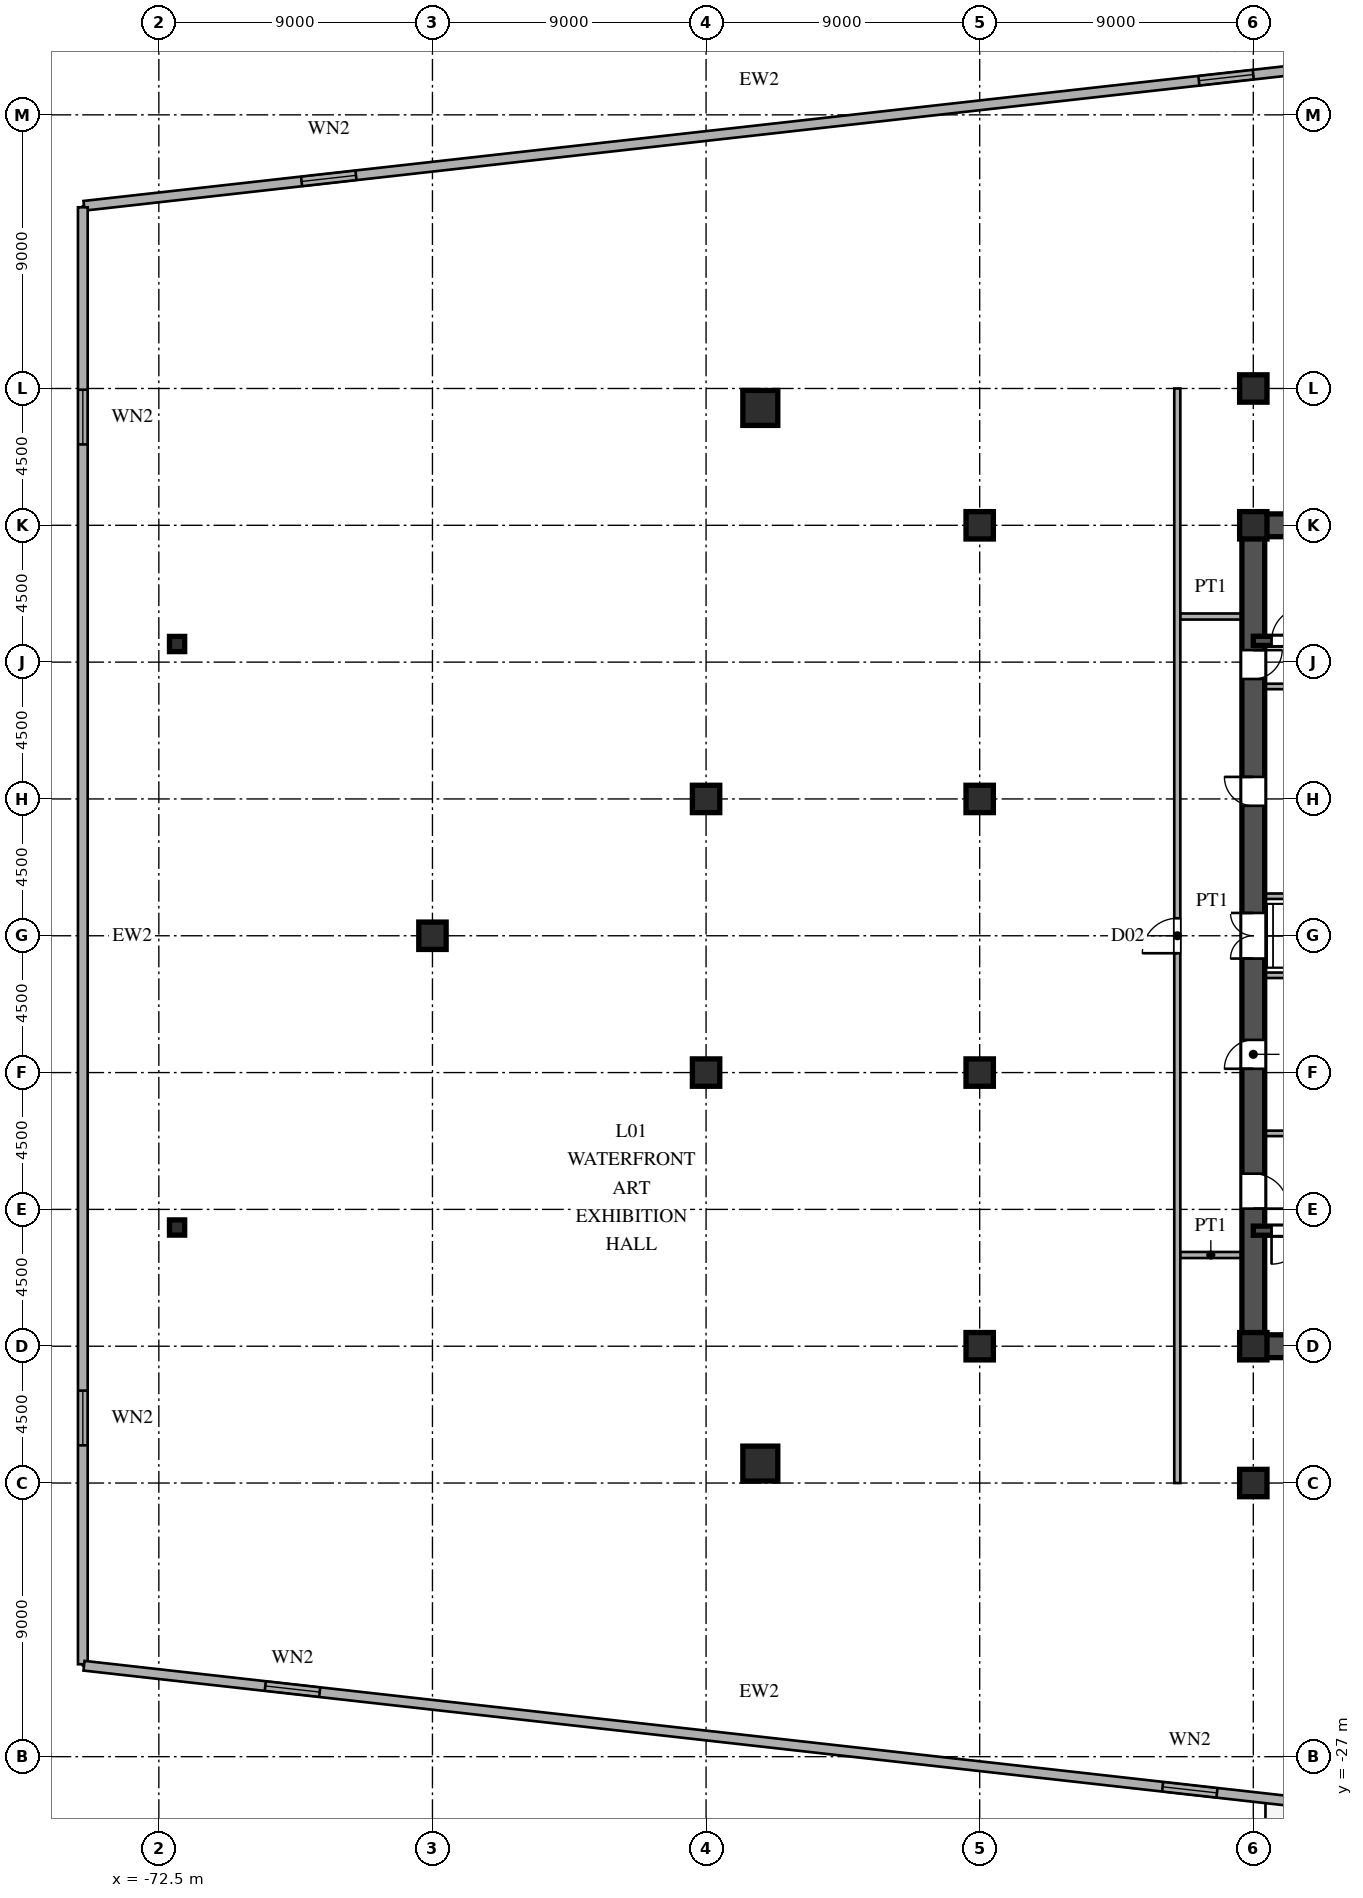
"""IFC4 building model, lengths in metres.
Left out: names, types, materials, properties, quantities, classifications, styles, units other than length and angle.
Written with IfcOpenShell. Run it as: python <this file> out.ifc"""

import sys

from ifc_helpers import new_model, si_unit, direction, frame, frame_2d, origin, origin_2d, place, context, subcontext, project, spatial, rectangle, hollow_rectangle, i_section, extrude, source, transform, mapped, element, fill, save


model = new_model("IFC4")
c1 = context("Model", 3, precision=1e-05, world=origin(), true_north=direction((0.0, 1.0)))
c2 = subcontext(c1, "Body", "Model", "MODEL_VIEW")
j1 = project(units=[si_unit("LENGTHUNIT", "METRE"), si_unit("PLANEANGLEUNIT", "RADIAN")], contexts=[c1])
p1 = place(None, origin())
s1 = spatial("IfcSite", under=j1, at=p1, CompositionType="ELEMENT")
p2 = place(p1, origin())
s2 = spatial("IfcBuilding", under=s1, at=p2, CompositionType="ELEMENT")
p3 = place(p2, frame((0.0, 0.0, 5.4)))
s3 = spatial("IfcBuildingStorey", under=s2, at=p3, CompositionType="ELEMENT", Elevation=5.4)
m1 = source(origin(), c2, "Body", "SweptSolid", [
    extrude(i_section(OverallWidth=0.9, OverallDepth=0.9, WebThickness=0.036, FlangeThickness=0.055, at=origin_2d()), origin(), (0.0, 0.0, 1.0), 4.5),
])
for number, where, z_axis, x_axis in (
    (1, (-36.5, -18.0, 0.0), (0.0, 0.0, 1.0), (1.0, 0.0, 0.0)),
    (2, (-36.5, -13.5, 0.0), (0.0, 0.0, 1.0), (1.0, 0.0, 0.0)),
    (3, (-36.5, 13.5, 0.0), (0.0, 0.0, 1.0), (1.0, 0.0, 0.0)),
    (4, (-36.5, 18.0, 0.0), (0.0, 0.0, 1.0), (1.0, 0.0, 0.0)),
    (5, (-45.5, -13.5, 0.0), (0.0, 0.0, 1.0), (1.0, 0.0, 0.0)),
    (6, (-45.5, -4.5, 0.0), (0.0, 0.0, 1.0), (1.0, 0.0, 0.0)),
    (7, (-45.5, 4.5, 0.0), (0.0, 0.0, 1.0), (1.0, 0.0, 0.0)),
    (8, (-45.5, 13.5, 0.0), (0.0, 0.0, 1.0), (1.0, 0.0, 0.0)),
    (9, (-54.5, -4.5, 0.0), (0.0, 0.0, 1.0), (1.0, 0.0, 0.0)),
    (10, (-54.5, 4.5, 0.0), (0.0, 0.0, 1.0), (1.0, 0.0, 0.0)),
    (11, (-63.5, 0.0, 0.0), (0.0, 0.0, 1.0), (1.0, 0.0, 0.0)),
):
    element("IfcColumn", number, at=place(p3, frame(where, z_axis=z_axis, x_axis=x_axis)), inside=s3, PredefinedType="COLUMN", context=c2, shape_type="MappedRepresentation", body=[
        mapped(m1, transform((0.0, 0.0, 0.0), scale=1.0)),
    ])
m2 = source(origin(), c2, "Body", "SweptSolid", [
    extrude(hollow_rectangle(XDim=0.5, YDim=0.5, WallThickness=0.02, at=origin_2d()), origin(), (0.0, 0.0, 1.0), 4.5),
])
for number, where, z_axis, x_axis in (
    (12, (-71.9, 9.596, 0.0), (0.0, 0.0, 1.0), (1.0, 0.0, 0.0)),
    (13, (-71.9, -9.596, 0.0), (0.0, 0.0, 1.0), (1.0, 0.0, 0.0)),
):
    element("IfcColumn", number, at=place(p3, frame(where, z_axis=z_axis, x_axis=x_axis)), inside=s3, PredefinedType="COLUMN", context=c2, shape_type="MappedRepresentation", body=[
        mapped(m2, transform((0.0, 0.0, 0.0), scale=1.0)),
    ])
m3 = source(origin(), c2, "Body", "SweptSolid", [
    extrude(hollow_rectangle(XDim=1.15, YDim=1.15, WallThickness=0.048, at=origin_2d()), origin(), (0.0, 0.0, 1.0), 4.5),
])
for number, where, z_axis, x_axis in (
    (14, (-52.716, -17.361, 0.0), (0.0, 0.0, 1.0), (1.0, 0.0, 0.0)),
    (15, (-52.716, 17.361, 0.0), (0.0, 0.0, 1.0), (1.0, 0.0, 0.0)),
):
    element("IfcColumn", number, at=place(p3, frame(where, z_axis=z_axis, x_axis=x_axis)), inside=s3, PredefinedType="COLUMN", context=c2, shape_type="MappedRepresentation", body=[
        mapped(m3, transform((0.0, 0.0, 0.0), scale=1.0)),
    ])
p4 = place(p3, frame((-74.96, -24.004, 0.0), z_axis=(0.0, 0.0, 1.0), x_axis=(0.993746430789, -0.111660338952, 0.0)))
e16 = element("IfcWall", 16, at=p4, inside=s3, PredefinedType="SOLIDWALL", context=c2, shape_type="SweptSolid", body=[
    extrude(rectangle(XDim=44.7, YDim=0.32, at=frame_2d((22.35, 0.0))), origin(), (0.0, 0.0, 1.0), 4.22),
])
p5 = place(p4, frame((6.0, 0.0, 0.85)))
e17 = element("IfcOpeningElement", 17, at=p5, cuts=e16, PredefinedType="OPENING", context=c2, shape_type="SweptSolid", body=[
    extrude(rectangle(XDim=1.8, YDim=2.0, at=frame_2d((0.9, 1.0))), frame((0.0, 0.17, 0.0), z_axis=(0.0, -1.0, 0.0), x_axis=(1.0, 0.0, 0.0)), (0.0, 0.0, 1.0), 0.34),
])
p6 = place(p4, frame((35.7, 0.0, 0.85)))
e18 = element("IfcOpeningElement", 18, at=p6, cuts=e16, PredefinedType="OPENING", context=c2, shape_type="SweptSolid", body=[
    extrude(rectangle(XDim=1.8, YDim=2.0, at=frame_2d((0.9, 1.0))), frame((0.0, 0.17, 0.0), z_axis=(0.0, -1.0, 0.0), x_axis=(1.0, 0.0, 0.0)), (0.0, 0.0, 1.0), 0.34),
])
p7 = place(p3, frame((-30.54, 28.996, 0.0), z_axis=(0.0, 0.0, 1.0), x_axis=(-0.993746430789, -0.111660338952, 0.0)))
e19 = element("IfcWall", 19, at=p7, inside=s3, PredefinedType="SOLIDWALL", context=c2, shape_type="SweptSolid", body=[
    extrude(rectangle(XDim=44.7, YDim=0.32, at=frame_2d((22.35, 0.0))), origin(), (0.0, 0.0, 1.0), 4.22),
])
p8 = place(p7, frame((6.0, 0.0, 0.85)))
e20 = element("IfcOpeningElement", 20, at=p8, cuts=e19, PredefinedType="OPENING", context=c2, shape_type="SweptSolid", body=[
    extrude(rectangle(XDim=1.8, YDim=2.0, at=frame_2d((0.9, 1.0))), frame((0.0, 0.17, 0.0), z_axis=(0.0, -1.0, 0.0), x_axis=(1.0, 0.0, 0.0)), (0.0, 0.0, 1.0), 0.34),
])
p9 = place(p7, frame((35.7, 0.0, 0.85)))
e21 = element("IfcOpeningElement", 21, at=p9, cuts=e19, PredefinedType="OPENING", context=c2, shape_type="SweptSolid", body=[
    extrude(rectangle(XDim=1.8, YDim=2.0, at=frame_2d((0.9, 1.0))), frame((0.0, 0.17, 0.0), z_axis=(0.0, -1.0, 0.0), x_axis=(1.0, 0.0, 0.0)), (0.0, 0.0, 1.0), 0.34),
])
p10 = place(p3, frame((-75.0, 23.96, 0.0), z_axis=(0.0, 0.0, 1.0), x_axis=(0.0, -1.0, 0.0)))
e22 = element("IfcWall", 22, at=p10, inside=s3, PredefinedType="SOLIDWALL", context=c2, shape_type="SweptSolid", body=[
    extrude(rectangle(XDim=47.92, YDim=0.32, at=frame_2d((23.96, 0.0))), origin(), (0.0, 0.0, 1.0), 4.22),
])
p11 = place(p10, frame((6.0, 0.0, 0.85)))
e23 = element("IfcOpeningElement", 23, at=p11, cuts=e22, PredefinedType="OPENING", context=c2, shape_type="SweptSolid", body=[
    extrude(rectangle(XDim=1.8, YDim=2.0, at=frame_2d((0.9, 1.0))), frame((0.0, 0.17, 0.0), z_axis=(0.0, -1.0, 0.0), x_axis=(1.0, 0.0, 0.0)), (0.0, 0.0, 1.0), 0.34),
])
p12 = place(p10, frame((38.92, 0.0, 0.85)))
e24 = element("IfcOpeningElement", 24, at=p12, cuts=e22, PredefinedType="OPENING", context=c2, shape_type="SweptSolid", body=[
    extrude(rectangle(XDim=1.8, YDim=2.0, at=frame_2d((0.9, 1.0))), frame((0.0, 0.17, 0.0), z_axis=(0.0, -1.0, 0.0), x_axis=(1.0, 0.0, 0.0)), (0.0, 0.0, 1.0), 0.34),
])
for number, where, z_axis, x_axis in (
    (25, (-36.5, -13.5, 0.0), (0.0, 0.0, 1.0), (1.0, 0.0, 0.0)),
    (26, (-36.5, 13.5, 0.0), (0.0, 0.0, 1.0), (1.0, 0.0, 0.0)),
):
    element("IfcWall", number, at=place(p3, frame(where, z_axis=z_axis, x_axis=x_axis)), inside=s3, PredefinedType="SHEAR", context=c2, shape_type="SweptSolid", body=[
        extrude(rectangle(XDim=9.0, YDim=0.75, at=frame_2d((4.5, 0.0))), origin(), (0.0, 0.0, 1.0), 4.22),
    ])
p13 = place(p3, frame((-36.5, -13.65, 0.0), z_axis=(0.0, 0.0, 1.0), x_axis=(0.0, 1.0, 0.0)))
e27 = element("IfcWall", 27, at=p13, inside=s3, PredefinedType="SHEAR", context=c2, shape_type="SweptSolid", body=[
    extrude(rectangle(XDim=7.15, YDim=0.75, at=frame_2d((3.575, 0.0))), origin(), (0.0, 0.0, 1.0), 4.22),
])
p14 = place(p13, frame((4.675, 0.0, 0.0)))
e28 = element("IfcOpeningElement", 28, at=p14, cuts=e27, PredefinedType="OPENING", context=c2, shape_type="SweptSolid", body=[
    extrude(rectangle(XDim=1.15, YDim=2.2, at=frame_2d((0.575, 1.1))), frame((0.0, 0.385, 0.0), z_axis=(0.0, -1.0, 0.0), x_axis=(1.0, 0.0, 0.0)), (0.0, 0.0, 1.0), 0.77),
])
p15 = place(p3, frame((-36.5, -1.3, 0.0), z_axis=(0.0, 0.0, 1.0), x_axis=(0.0, 1.0, 0.0)))
e29 = element("IfcWall", 29, at=p15, inside=s3, PredefinedType="SHEAR", context=c2, shape_type="SweptSolid", body=[
    extrude(rectangle(XDim=2.6, YDim=0.75, at=frame_2d((1.3, 0.0))), origin(), (0.0, 0.0, 1.0), 4.22),
])
p16 = place(p15, frame((0.55, 0.0, 0.0)))
e30 = element("IfcOpeningElement", 30, at=p16, cuts=e29, PredefinedType="OPENING", context=c2, shape_type="SweptSolid", body=[
    extrude(rectangle(XDim=1.5, YDim=2.3, at=frame_2d((0.75, 1.15))), frame((0.0, 0.385, 0.0), z_axis=(0.0, -1.0, 0.0), x_axis=(1.0, 0.0, 0.0)), (0.0, 0.0, 1.0), 0.77),
])
p17 = place(p3, frame((-36.5, 8.2, 0.0), z_axis=(0.0, 0.0, 1.0), x_axis=(0.0, 1.0, 0.0)))
e31 = element("IfcWall", 31, at=p17, inside=s3, PredefinedType="SHEAR", context=c2, shape_type="SweptSolid", body=[
    extrude(rectangle(XDim=5.45, YDim=0.75, at=frame_2d((2.725, 0.0))), origin(), (0.0, 0.0, 1.0), 4.22),
])
p18 = place(p17, frame((0.245, 0.0, 0.0)))
e32 = element("IfcOpeningElement", 32, at=p18, cuts=e31, PredefinedType="OPENING", context=c2, shape_type="SweptSolid", body=[
    extrude(rectangle(XDim=0.95, YDim=2.15, at=frame_2d((0.475, 1.075))), frame((0.0, 0.385, 0.0), z_axis=(0.0, -1.0, 0.0), x_axis=(1.0, 0.0, 0.0)), (0.0, 0.0, 1.0), 0.77),
])
p19 = place(p3, frame((-36.5, -6.5, 0.0), z_axis=(0.0, 0.0, 1.0), x_axis=(0.0, 1.0, 0.0)))
e33 = element("IfcWall", 33, at=p19, inside=s3, PredefinedType="SHEAR", context=c2, shape_type="SweptSolid", body=[
    extrude(rectangle(XDim=5.2, YDim=0.75, at=frame_2d((2.6, 0.0))), origin(), (0.0, 0.0, 1.0), 4.22),
])
p20 = place(p19, frame((2.125, 0.0, 0.0)))
e34 = element("IfcOpeningElement", 34, at=p20, cuts=e33, PredefinedType="OPENING", context=c2, shape_type="SweptSolid", body=[
    extrude(rectangle(XDim=0.95, YDim=2.15, at=frame_2d((0.475, 1.075))), frame((0.0, 0.385, 0.0), z_axis=(0.0, -1.0, 0.0), x_axis=(1.0, 0.0, 0.0)), (0.0, 0.0, 1.0), 0.77),
])
p21 = place(p3, frame((-36.5, 1.3, 0.0), z_axis=(0.0, 0.0, 1.0), x_axis=(0.0, 1.0, 0.0)))
e35 = element("IfcWall", 35, at=p21, inside=s3, PredefinedType="SHEAR", context=c2, shape_type="SweptSolid", body=[
    extrude(rectangle(XDim=6.9, YDim=0.75, at=frame_2d((3.45, 0.0))), origin(), (0.0, 0.0, 1.0), 4.22),
])
p22 = place(p21, frame((2.975, 0.0, 0.0)))
e36 = element("IfcOpeningElement", 36, at=p22, cuts=e35, PredefinedType="OPENING", context=c2, shape_type="SweptSolid", body=[
    extrude(rectangle(XDim=0.95, YDim=2.15, at=frame_2d((0.475, 1.075))), frame((0.0, 0.385, 0.0), z_axis=(0.0, -1.0, 0.0), x_axis=(1.0, 0.0, 0.0)), (0.0, 0.0, 1.0), 0.77),
])
p23 = place(p3, frame((-36.5, -9.7, 0.0), z_axis=(0.0, 0.0, 1.0), x_axis=(1.0, 0.0, 0.0)))
e37 = element("IfcWall", 37, at=p23, inside=s3, PredefinedType="SHEAR", context=c2, shape_type="SweptSolid", body=[
    extrude(rectangle(XDim=9.0, YDim=0.3, at=frame_2d((4.5, 0.0))), origin(), (0.0, 0.0, 1.0), 4.22),
])
p24 = place(p23, frame((0.6, 0.0, 0.0)))
e38 = element("IfcOpeningElement", 38, at=p24, cuts=e37, PredefinedType="OPENING", context=c2, shape_type="SweptSolid", body=[
    extrude(rectangle(XDim=1.1, YDim=2.2, at=frame_2d((0.55, 1.1))), frame((0.0, 0.16, 0.0), z_axis=(0.0, -1.0, 0.0), x_axis=(1.0, 0.0, 0.0)), (0.0, 0.0, 1.0), 0.32),
])
p25 = place(p3, frame((-36.5, 9.7, 0.0), z_axis=(0.0, 0.0, 1.0), x_axis=(1.0, 0.0, 0.0)))
e39 = element("IfcWall", 39, at=p25, inside=s3, PredefinedType="SHEAR", context=c2, shape_type="SweptSolid", body=[
    extrude(rectangle(XDim=9.0, YDim=0.3, at=frame_2d((4.5, 0.0))), origin(), (0.0, 0.0, 1.0), 4.22),
])
p26 = place(p25, frame((0.6, 0.0, 0.0)))
e40 = element("IfcOpeningElement", 40, at=p26, cuts=e39, PredefinedType="OPENING", context=c2, shape_type="SweptSolid", body=[
    extrude(rectangle(XDim=1.1, YDim=2.2, at=frame_2d((0.55, 1.1))), frame((0.0, 0.16, 0.0), z_axis=(0.0, -1.0, 0.0), x_axis=(1.0, 0.0, 0.0)), (0.0, 0.0, 1.0), 0.32),
])
for number, where, z_axis, x_axis in (
    (41, (-36.15, -6.5, 0.0), (0.0, 0.0, 1.0), (1.0, 0.0, 0.0)),
    (42, (-36.15, 8.2, 0.0), (0.0, 0.0, 1.0), (1.0, 0.0, 0.0)),
):
    element("IfcWall", number, at=place(p3, frame(where, z_axis=z_axis, x_axis=x_axis)), inside=s3, PredefinedType="PARTITIONING", context=c2, shape_type="SweptSolid", body=[
        extrude(rectangle(XDim=5.7, YDim=0.18, at=frame_2d((2.85, 0.0))), origin(), (0.0, 0.0, 1.0), 4.22),
    ])
for number, where, z_axis, x_axis in (
    (43, (-36.15, -1.3, 0.0), (0.0, 0.0, 1.0), (1.0, 0.0, 0.0)),
    (44, (-36.15, 1.3, 0.0), (0.0, 0.0, 1.0), (1.0, 0.0, 0.0)),
):
    element("IfcWall", number, at=place(p3, frame(where, z_axis=z_axis, x_axis=x_axis)), inside=s3, PredefinedType="PARTITIONING", context=c2, shape_type="SweptSolid", body=[
        extrude(rectangle(XDim=2.95, YDim=0.18, at=frame_2d((1.475, 0.0))), origin(), (0.0, 0.0, 1.0), 4.22),
    ])
for number, where, z_axis, x_axis in (
    (45, (-38.915, -10.5, 0.0), (0.0, 0.0, 1.0), (1.0, 0.0, 0.0)),
    (46, (-38.915, 10.5, 0.0), (0.0, 0.0, 1.0), (1.0, 0.0, 0.0)),
):
    element("IfcWall", number, at=place(p3, frame(where, z_axis=z_axis, x_axis=x_axis)), inside=s3, PredefinedType="PARTITIONING", context=c2, shape_type="SweptSolid", body=[
        extrude(rectangle(XDim=2.035, YDim=0.2, at=frame_2d((1.018, 0.0))), origin(), (0.0, 0.0, 1.0), 4.22),
    ])
p27 = place(p3, frame((-39.0, -18.0, 0.0), z_axis=(0.0, 0.0, 1.0), x_axis=(0.0, 1.0, 0.0)))
e47 = element("IfcWall", 47, at=p27, inside=s3, PredefinedType="PARTITIONING", context=c2, shape_type="SweptSolid", body=[
    extrude(rectangle(XDim=36.0, YDim=0.2, at=frame_2d((18.0, 0.0))), origin(), (0.0, 0.0, 1.0), 4.22),
])
p28 = place(p27, frame((17.425, 0.0, 0.0)))
e48 = element("IfcOpeningElement", 48, at=p28, cuts=e47, PredefinedType="OPENING", context=c2, shape_type="SweptSolid", body=[
    extrude(rectangle(XDim=1.15, YDim=2.2, at=frame_2d((0.575, 1.1))), frame((0.0, 0.11, 0.0), z_axis=(0.0, -1.0, 0.0), x_axis=(1.0, 0.0, 0.0)), (0.0, 0.0, 1.0), 0.22),
])
m4 = source(origin(), c2, "Body", "SweptSolid", [
    extrude(rectangle(XDim=1.8, YDim=2.0, at=frame_2d((0.9, 1.0))), frame((0.0, 0.03, 0.0), z_axis=(0.0, -1.0, 0.0), x_axis=(1.0, 0.0, 0.0)), (0.0, 0.0, 1.0), 0.06),
])
p29 = place(p5, origin())
e49 = element("IfcWindow", 49, at=p29, inside=s3, PartitioningType="SINGLE_PANEL", PredefinedType="WINDOW", context=c2, shape_type="MappedRepresentation", body=[
    mapped(m4, transform((0.0, 0.0, 0.0), scale=1.0)),
])
fill(e17, e49)
p30 = place(p6, origin())
e50 = element("IfcWindow", 50, at=p30, inside=s3, PartitioningType="SINGLE_PANEL", PredefinedType="WINDOW", context=c2, shape_type="MappedRepresentation", body=[
    mapped(m4, transform((0.0, 0.0, 0.0), scale=1.0)),
])
fill(e18, e50)
p31 = place(p8, origin())
e51 = element("IfcWindow", 51, at=p31, inside=s3, PartitioningType="SINGLE_PANEL", PredefinedType="WINDOW", context=c2, shape_type="MappedRepresentation", body=[
    mapped(m4, transform((0.0, 0.0, 0.0), scale=1.0)),
])
fill(e20, e51)
p32 = place(p9, origin())
e52 = element("IfcWindow", 52, at=p32, inside=s3, PartitioningType="SINGLE_PANEL", PredefinedType="WINDOW", context=c2, shape_type="MappedRepresentation", body=[
    mapped(m4, transform((0.0, 0.0, 0.0), scale=1.0)),
])
fill(e21, e52)
p33 = place(p11, origin())
e53 = element("IfcWindow", 53, at=p33, inside=s3, PartitioningType="SINGLE_PANEL", PredefinedType="WINDOW", context=c2, shape_type="MappedRepresentation", body=[
    mapped(m4, transform((0.0, 0.0, 0.0), scale=1.0)),
])
fill(e23, e53)
p34 = place(p12, origin())
e54 = element("IfcWindow", 54, at=p34, inside=s3, PartitioningType="SINGLE_PANEL", PredefinedType="WINDOW", context=c2, shape_type="MappedRepresentation", body=[
    mapped(m4, transform((0.0, 0.0, 0.0), scale=1.0)),
])
fill(e24, e54)
m5 = source(origin(), c2, "Body", "SweptSolid", [
    extrude(rectangle(XDim=1.15, YDim=2.2, at=frame_2d((0.575, 1.1))), frame((0.0, 0.025, 0.0), z_axis=(0.0, -1.0, 0.0), x_axis=(1.0, 0.0, 0.0)), (0.0, 0.0, 1.0), 0.05),
])
p35 = place(p14, frame((1.15, 0.0, 0.0), z_axis=(0.0, 0.0, 1.0), x_axis=(-1.0, 0.0, 0.0)))
e55 = element("IfcDoor", 55, at=p35, inside=s3, OperationType="SINGLE_SWING_LEFT", PredefinedType="DOOR", context=c2, shape_type="MappedRepresentation", body=[
    mapped(m5, transform((0.0, 0.0, 0.0), scale=1.0)),
])
fill(e28, e55)
m6 = source(origin(), c2, "Body", "SweptSolid", [
    extrude(rectangle(XDim=1.5, YDim=2.3, at=frame_2d((0.75, 1.15))), frame((0.0, 0.025, 0.0), z_axis=(0.0, -1.0, 0.0), x_axis=(1.0, 0.0, 0.0)), (0.0, 0.0, 1.0), 0.05),
])
p36 = place(p16, origin())
e56 = element("IfcDoor", 56, at=p36, inside=s3, OperationType="DOUBLE_SWING_LEFT", PredefinedType="DOOR", context=c2, shape_type="MappedRepresentation", body=[
    mapped(m6, transform((0.0, 0.0, 0.0), scale=1.0)),
])
fill(e30, e56)
m7 = source(origin(), c2, "Body", "SweptSolid", [
    extrude(rectangle(XDim=0.95, YDim=2.15, at=frame_2d((0.475, 1.075))), frame((0.0, 0.025, 0.0), z_axis=(0.0, -1.0, 0.0), x_axis=(1.0, 0.0, 0.0)), (0.0, 0.0, 1.0), 0.05),
])
p37 = place(p18, frame((0.95, 0.0, 0.0), z_axis=(0.0, 0.0, 1.0), x_axis=(-1.0, 0.0, 0.0)))
e57 = element("IfcDoor", 57, at=p37, inside=s3, OperationType="SINGLE_SWING_RIGHT", PredefinedType="DOOR", context=c2, shape_type="MappedRepresentation", body=[
    mapped(m7, transform((0.0, 0.0, 0.0), scale=1.0)),
])
fill(e32, e57)
p38 = place(p20, origin())
e58 = element("IfcDoor", 58, at=p38, inside=s3, OperationType="SINGLE_SWING_LEFT", PredefinedType="DOOR", context=c2, shape_type="MappedRepresentation", body=[
    mapped(m7, transform((0.0, 0.0, 0.0), scale=1.0)),
])
fill(e34, e58)
p39 = place(p22, origin())
e59 = element("IfcDoor", 59, at=p39, inside=s3, OperationType="SINGLE_SWING_RIGHT", PredefinedType="DOOR", context=c2, shape_type="MappedRepresentation", body=[
    mapped(m7, transform((0.0, 0.0, 0.0), scale=1.0)),
])
fill(e36, e59)
m8 = source(origin(), c2, "Body", "SweptSolid", [
    extrude(rectangle(XDim=1.1, YDim=2.2, at=frame_2d((0.55, 1.1))), frame((0.0, 0.025, 0.0), z_axis=(0.0, -1.0, 0.0), x_axis=(1.0, 0.0, 0.0)), (0.0, 0.0, 1.0), 0.05),
])
p40 = place(p24, frame((1.1, 0.0, 0.0), z_axis=(0.0, 0.0, 1.0), x_axis=(-1.0, 0.0, 0.0)))
e60 = element("IfcDoor", 60, at=p40, inside=s3, OperationType="SINGLE_SWING_LEFT", PredefinedType="DOOR", context=c2, shape_type="MappedRepresentation", body=[
    mapped(m8, transform((0.0, 0.0, 0.0), scale=1.0)),
])
fill(e38, e60)
p41 = place(p26, origin())
e61 = element("IfcDoor", 61, at=p41, inside=s3, OperationType="SINGLE_SWING_RIGHT", PredefinedType="DOOR", context=c2, shape_type="MappedRepresentation", body=[
    mapped(m8, transform((0.0, 0.0, 0.0), scale=1.0)),
])
fill(e40, e61)
p42 = place(p28, origin())
e62 = element("IfcDoor", 62, at=p42, inside=s3, OperationType="SINGLE_SWING_LEFT", PredefinedType="DOOR", context=c2, shape_type="MappedRepresentation", body=[
    mapped(m5, transform((0.0, 0.0, 0.0), scale=1.0)),
])
fill(e48, e62)
save(model, sys.argv[1])
